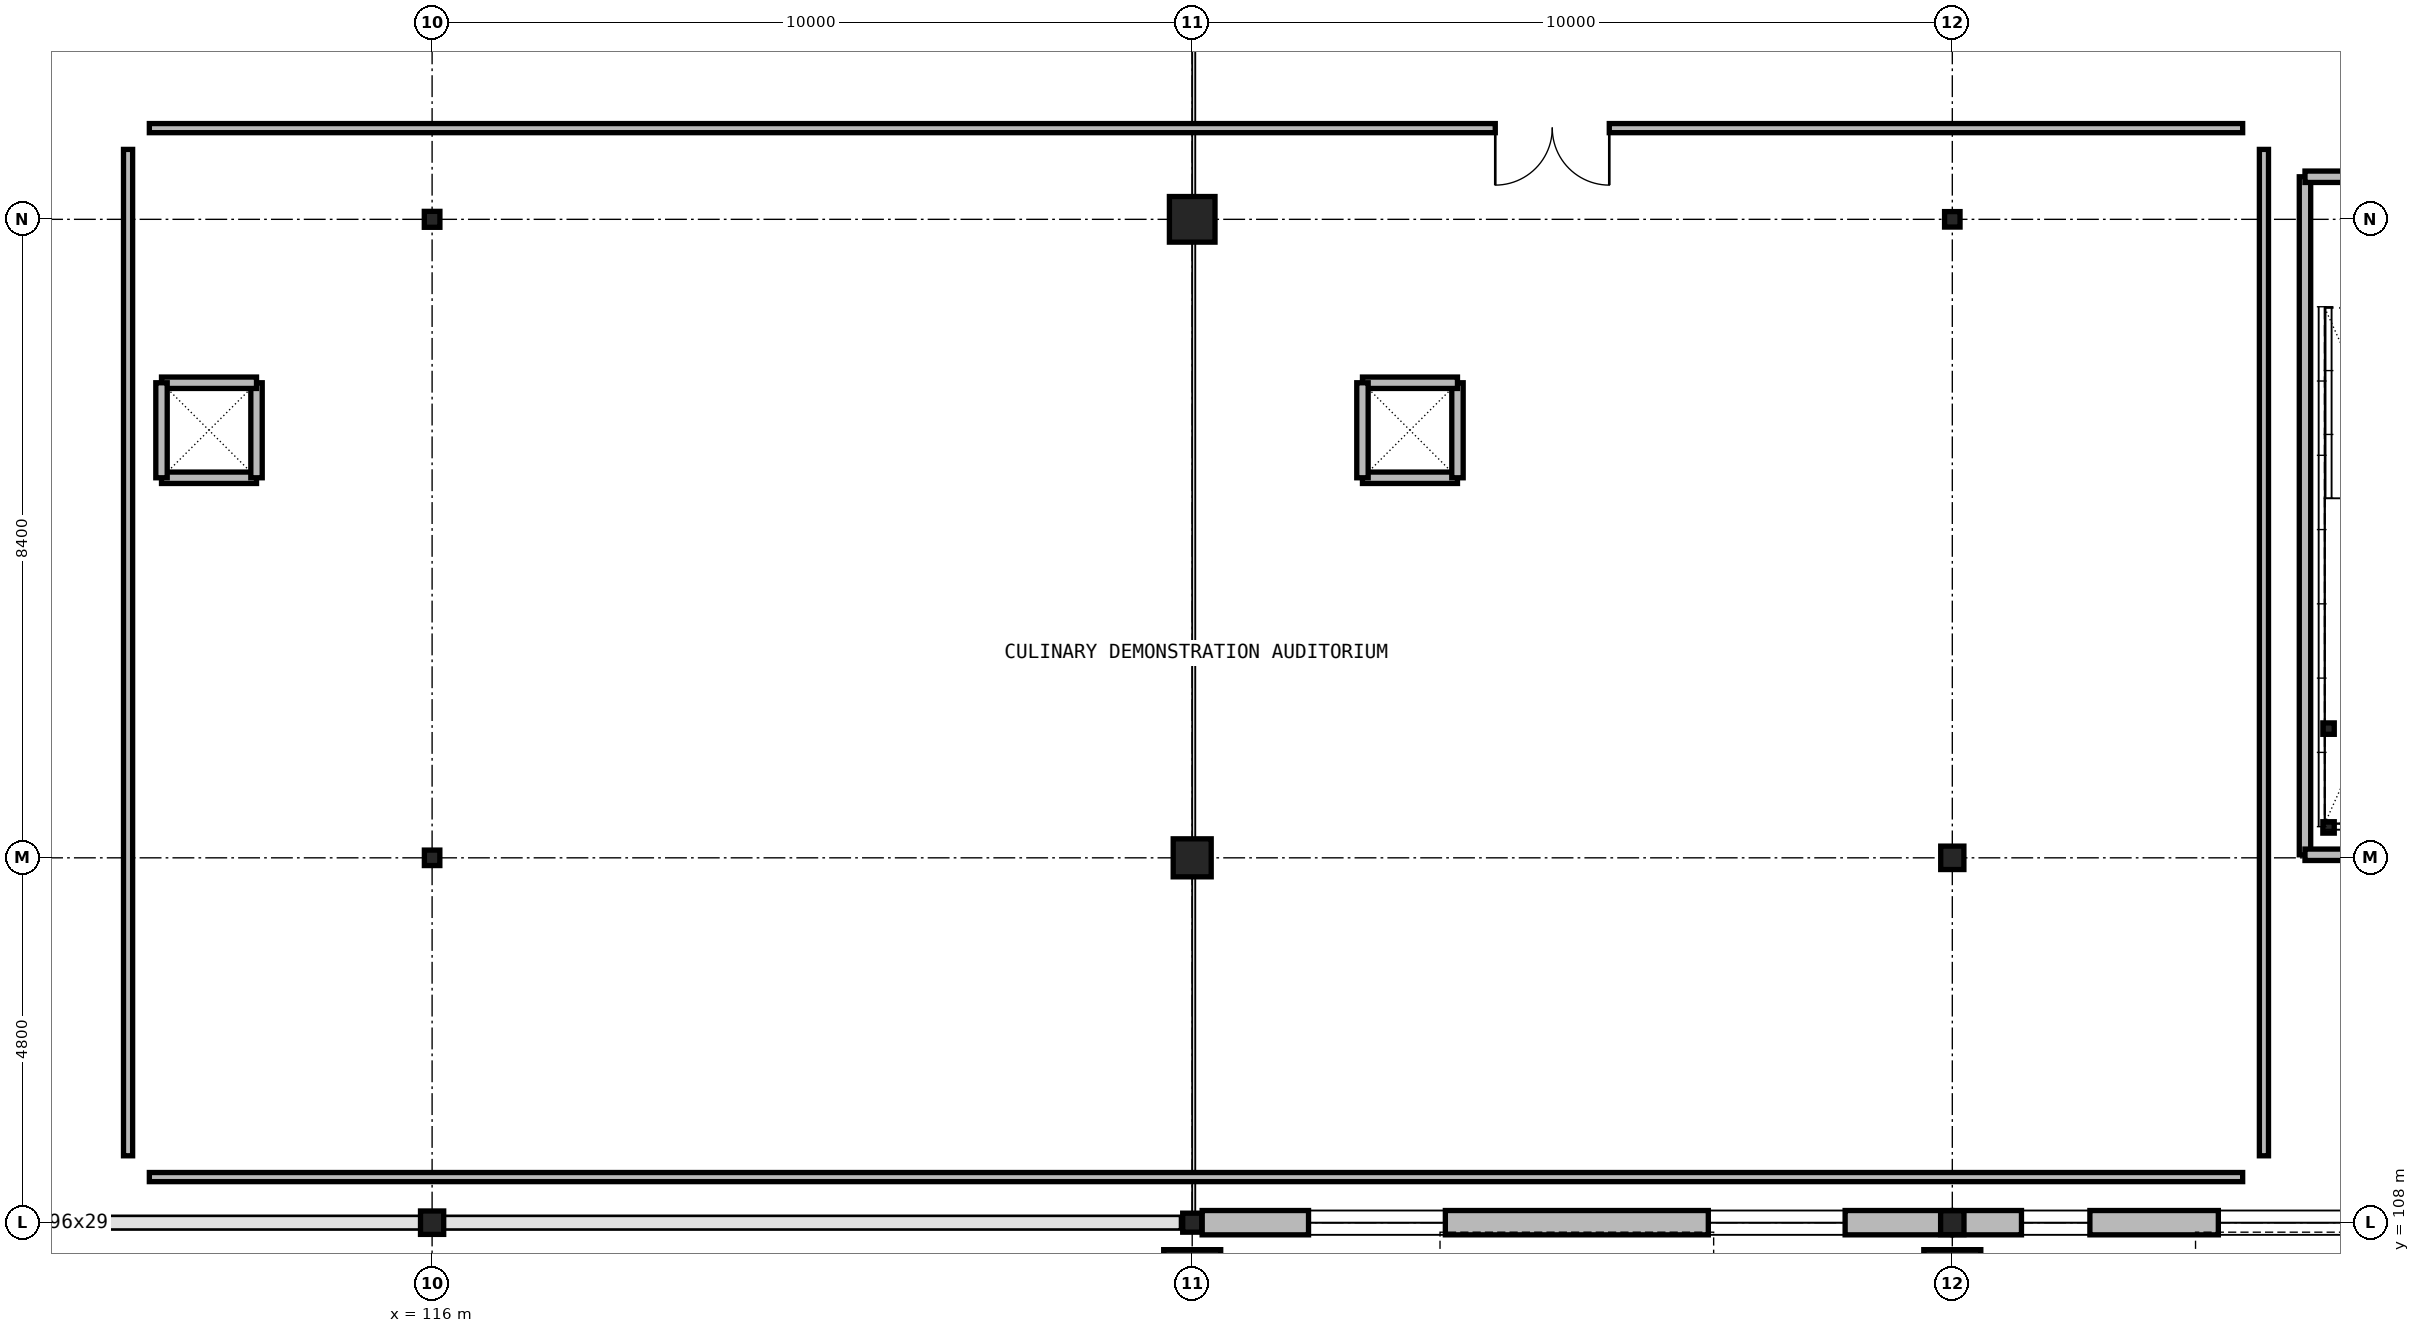
"""IFC4 building model, lengths in metres.
Left out: names, types, materials, properties, quantities, classifications, styles, units other than length and angle.
Written with IfcOpenShell. Run it as: python <this file> out.ifc"""

import sys

from ifc_helpers import new_model, si_unit, direction, frame, frame_2d, origin, origin_2d_with_axis, place, context, subcontext, project, spatial, rectangle, hollow_rectangle, i_section, extrude, element, fill, save


model = new_model("IFC4")
c1 = context("Model", 3, precision=1e-05, world=origin(), true_north=direction((0.0, 1.0)))
c2 = subcontext(c1, "Body", "Model", "MODEL_VIEW")
j1 = project(units=[si_unit("LENGTHUNIT", "METRE"), si_unit("PLANEANGLEUNIT", "RADIAN")], contexts=[c1])
p1 = place(None, origin())
s1 = spatial("IfcSite", under=j1, at=p1, CompositionType="ELEMENT")
p2 = place(p1, origin())
s2 = spatial("IfcBuilding", under=s1, at=p2, CompositionType="ELEMENT")
p3 = place(p2, frame((0.0, 0.0, 8.4)))
s3 = spatial("IfcBuildingStorey", under=s2, at=p3, CompositionType="ELEMENT", Elevation=8.4)
for number, where, z_axis, x_axis in (
    (1, (126.0, 107.42, 0.0), (0.0, 0.0, 1.0), (1.0, 0.0, 0.0)),
    (2, (136.0, 107.42, 0.0), (0.0, 0.0, 1.0), (1.0, 0.0, 0.0)),
):
    element("IfcColumn", number, at=place(p3, frame(where, z_axis=z_axis, x_axis=x_axis)), inside=s3, PredefinedType="PILASTER", context=c2, shape_type="SweptSolid", body=[
        extrude(rectangle(XDim=0.75, YDim=0.45, at=origin_2d_with_axis()), origin(), (0.0, 0.0, 1.0), 3.6),
    ])
p4 = place(p3, frame((116.0, 108.0, 0.0), z_axis=(0.0, 0.0, 1.0), x_axis=(1.0, 0.0, 0.0)))
e3 = element("IfcColumn", 3, at=p4, inside=s3, PredefinedType="COLUMN", context=c2, shape_type="SweptSolid", body=[
    extrude(i_section(OverallWidth=0.305, OverallDepth=0.308, WebThickness=0.01, FlangeThickness=0.015, FilletRadius=0.017, at=origin_2d_with_axis()), origin(), (0.0, 0.0, 1.0), 3.6),
])
p5 = place(p3, frame((116.0, 112.8, 0.0), z_axis=(0.0, 0.0, 1.0), x_axis=(1.0, 0.0, 0.0)))
e4 = element("IfcColumn", 4, at=p5, inside=s3, PredefinedType="COLUMN", context=c2, shape_type="SweptSolid", body=[
    extrude(i_section(OverallWidth=0.203, OverallDepth=0.203, WebThickness=0.007, FlangeThickness=0.011, FilletRadius=0.011, at=origin_2d_with_axis()), origin(), (0.0, 0.0, 1.0), 3.6),
])
p6 = place(p3, frame((116.0, 121.2, 0.0), z_axis=(0.0, 0.0, 1.0), x_axis=(1.0, 0.0, 0.0)))
e5 = element("IfcColumn", 5, at=p6, inside=s3, PredefinedType="COLUMN", context=c2, shape_type="SweptSolid", body=[
    extrude(i_section(OverallWidth=0.205, OverallDepth=0.21, WebThickness=0.009, FlangeThickness=0.014, FilletRadius=0.011, at=origin_2d_with_axis()), origin(), (0.0, 0.0, 1.0), 3.6),
])
p7 = place(p3, frame((126.0, 108.0, 0.0), z_axis=(0.0, 0.0, 1.0), x_axis=(1.0, 0.0, 0.0)))
e6 = element("IfcColumn", 6, at=p7, inside=s3, PredefinedType="COLUMN", context=c2, shape_type="SweptSolid", body=[
    extrude(hollow_rectangle(XDim=0.25, YDim=0.25, WallThickness=0.009, InnerFilletRadius=0.009, OuterFilletRadius=0.018, at=origin_2d_with_axis()), origin(), (0.0, 0.0, 1.0), 3.6),
])
p8 = place(p3, frame((126.0, 112.8, 0.0), z_axis=(0.0, 0.0, 1.0), x_axis=(1.0, 0.0, 0.0)))
e7 = element("IfcColumn", 7, at=p8, inside=s3, PredefinedType="COLUMN", context=c2, shape_type="SweptSolid", body=[
    extrude(rectangle(XDim=0.5, YDim=0.5, at=origin_2d_with_axis()), origin(), (0.0, 0.0, 1.0), 3.6),
])
p9 = place(p3, frame((126.0, 121.2, 0.0), z_axis=(0.0, 0.0, 1.0), x_axis=(1.0, 0.0, 0.0)))
e8 = element("IfcColumn", 8, at=p9, inside=s3, PredefinedType="COLUMN", context=c2, shape_type="SweptSolid", body=[
    extrude(rectangle(XDim=0.6, YDim=0.6, at=origin_2d_with_axis()), origin(), (0.0, 0.0, 1.0), 3.6),
])
p10 = place(p3, frame((136.0, 108.0, 0.0), z_axis=(0.0, 0.0, 1.0), x_axis=(1.0, 0.0, 0.0)))
e9 = element("IfcColumn", 9, at=p10, inside=s3, PredefinedType="COLUMN", context=c2, shape_type="SweptSolid", body=[
    extrude(i_section(OverallWidth=0.307, OverallDepth=0.315, WebThickness=0.012, FlangeThickness=0.019, FilletRadius=0.017, at=origin_2d_with_axis()), origin(), (0.0, 0.0, 1.0), 3.6),
])
p11 = place(p3, frame((136.0, 112.8, 0.0), z_axis=(0.0, 0.0, 1.0), x_axis=(1.0, 0.0, 0.0)))
e10 = element("IfcColumn", 10, at=p11, inside=s3, PredefinedType="COLUMN", context=c2, shape_type="SweptSolid", body=[
    extrude(i_section(OverallWidth=0.305, OverallDepth=0.308, WebThickness=0.01, FlangeThickness=0.015, FilletRadius=0.017, at=origin_2d_with_axis()), origin(), (0.0, 0.0, 1.0), 3.6),
])
p12 = place(p3, frame((136.0, 121.2, 0.0), z_axis=(0.0, 0.0, 1.0), x_axis=(1.0, 0.0, 0.0)))
e11 = element("IfcColumn", 11, at=p12, inside=s3, PredefinedType="COLUMN", context=c2, shape_type="SweptSolid", body=[
    extrude(i_section(OverallWidth=0.203, OverallDepth=0.203, WebThickness=0.007, FlangeThickness=0.011, FilletRadius=0.011, at=origin_2d_with_axis()), origin(), (0.0, 0.0, 1.0), 3.6),
])
for number, where, z_axis, x_axis in (
    (12, (140.95, 113.2, 0.0), (0.0, 0.0, 1.0), (1.0, 0.0, 0.0)),
    (13, (140.95, 114.5, 0.0), (0.0, 0.0, 1.0), (1.0, 0.0, 0.0)),
):
    element("IfcColumn", number, at=place(p3, frame(where, z_axis=z_axis, x_axis=x_axis)), inside=s3, PredefinedType="COLUMN", context=c2, shape_type="SweptSolid", body=[
        extrude(hollow_rectangle(XDim=0.15, YDim=0.15, WallThickness=0.006, InnerFilletRadius=0.006, OuterFilletRadius=0.012, at=origin_2d_with_axis()), origin(), (0.0, 0.0, 1.0), 3.6),
    ])
p13 = place(p3, frame((126.131, 108.0, 0.0), z_axis=(0.0, 0.0, 1.0), x_axis=(1.0, 0.0, 0.0)))
e14 = element("IfcWall", 14, at=p13, inside=s3, PredefinedType="SOLIDWALL", context=c2, shape_type="SweptSolid", body=[
    extrude(rectangle(XDim=9.859, YDim=0.32, at=frame_2d((4.93, 0.0), x_axis=(1.0, 0.0))), origin(), (0.0, 0.0, 1.0), 2.92),
])
p14 = place(p13, frame((1.4, 0.0, 0.85)))
e15 = element("IfcOpeningElement", 15, at=p14, cuts=e14, PredefinedType="OPENING", context=c2, shape_type="SweptSolid", body=[
    extrude(rectangle(XDim=1.8, YDim=1.9, at=frame_2d((0.9, 0.95), x_axis=(1.0, 0.0))), frame((0.0, 0.17, 0.0), z_axis=(0.0, -1.0, 0.0), x_axis=(1.0, 0.0, 0.0)), (0.0, 0.0, 1.0), 0.34),
])
p15 = place(p13, frame((6.659, 0.0, 0.85)))
e16 = element("IfcOpeningElement", 16, at=p15, cuts=e14, PredefinedType="OPENING", context=c2, shape_type="SweptSolid", body=[
    extrude(rectangle(XDim=1.8, YDim=1.9, at=frame_2d((0.9, 0.95), x_axis=(1.0, 0.0))), frame((0.0, 0.17, 0.0), z_axis=(0.0, -1.0, 0.0), x_axis=(1.0, 0.0, 0.0)), (0.0, 0.0, 1.0), 0.34),
])
p16 = place(p3, frame((136.01, 108.0, 0.0), z_axis=(0.0, 0.0, 1.0), x_axis=(1.0, 0.0, 0.0)))
e17 = element("IfcWall", 17, at=p16, inside=s3, PredefinedType="SOLIDWALL", context=c2, shape_type="SweptSolid", body=[
    extrude(rectangle(XDim=9.98, YDim=0.32, at=frame_2d((4.99, 0.0), x_axis=(1.0, 0.0))), origin(), (0.0, 0.0, 1.0), 2.92),
])
p17 = place(p16, frame((3.49, 0.0, 0.85)))
e18 = element("IfcOpeningElement", 18, at=p17, cuts=e17, PredefinedType="OPENING", context=c2, shape_type="SweptSolid", body=[
    extrude(rectangle(XDim=3.0, YDim=1.9, at=frame_2d((1.5, 0.95), x_axis=(1.0, 0.0))), frame((0.0, 0.17, 0.0), z_axis=(0.0, -1.0, 0.0), x_axis=(1.0, 0.0, 0.0)), (0.0, 0.0, 1.0), 0.34),
])
p18 = place(p16, frame((0.9, 0.0, 0.85)))
e19 = element("IfcOpeningElement", 19, at=p18, cuts=e17, PredefinedType="OPENING", context=c2, shape_type="SweptSolid", body=[
    extrude(rectangle(XDim=0.9, YDim=1.9, at=frame_2d((0.45, 0.95), x_axis=(1.0, 0.0))), frame((0.0, 0.17, 0.0), z_axis=(0.0, -1.0, 0.0), x_axis=(1.0, 0.0, 0.0)), (0.0, 0.0, 1.0), 0.34),
])
p19 = place(p16, frame((8.18, 0.0, 0.85)))
e20 = element("IfcOpeningElement", 20, at=p19, cuts=e17, PredefinedType="OPENING", context=c2, shape_type="SweptSolid", body=[
    extrude(rectangle(XDim=0.9, YDim=1.9, at=frame_2d((0.45, 0.95), x_axis=(1.0, 0.0))), frame((0.0, 0.17, 0.0), z_axis=(0.0, -1.0, 0.0), x_axis=(1.0, 0.0, 0.0)), (0.0, 0.0, 1.0), 0.34),
])
p20 = place(p3, frame((140.64, 121.76, 0.0), z_axis=(0.0, 0.0, 1.0), x_axis=(0.0, -1.0, 0.0)))
e21 = element("IfcWall", 21, at=p20, inside=s3, PredefinedType="PARTITIONING", context=c2, shape_type="SweptSolid", body=[
    extrude(rectangle(XDim=8.92, YDim=0.15, at=frame_2d((4.46, 0.0), x_axis=(1.0, 0.0))), origin(), (0.0, 0.0, 1.0), 2.78),
])
p21 = place(p3, frame((140.64, 112.84, 0.0), z_axis=(0.0, 0.0, 1.0), x_axis=(1.0, 0.0, 0.0)))
e22 = element("IfcWall", 22, at=p21, inside=s3, PredefinedType="PARTITIONING", context=c2, shape_type="SweptSolid", body=[
    extrude(rectangle(XDim=3.62, YDim=0.15, at=frame_2d((1.81, 0.0), x_axis=(1.0, 0.0))), origin(), (0.0, 0.0, 1.0), 2.78),
])
p22 = place(p3, frame((144.26, 121.76, 0.0), z_axis=(0.0, 0.0, 1.0), x_axis=(-1.0, 0.0, 0.0)))
e23 = element("IfcWall", 23, at=p22, inside=s3, PredefinedType="PARTITIONING", context=c2, shape_type="SweptSolid", body=[
    extrude(rectangle(XDim=3.62, YDim=0.15, at=frame_2d((1.81, 0.0), x_axis=(1.0, 0.0))), origin(), (0.0, 0.0, 1.0), 2.78),
])
p23 = place(p22, frame((1.31, 0.0, 0.0)))
e24 = element("IfcOpeningElement", 24, at=p23, cuts=e23, PredefinedType="OPENING", context=c2, shape_type="SweptSolid", body=[
    extrude(rectangle(XDim=1.0, YDim=2.15, at=frame_2d((0.5, 1.075), x_axis=(1.0, 0.0))), frame((0.0, 0.085, 0.0), z_axis=(0.0, -1.0, 0.0), x_axis=(1.0, 0.0, 0.0)), (0.0, 0.0, 1.0), 0.17),
])
for number, where, z_axis, x_axis in (
    (25, (112.44, 117.8, 0.0), (0.0, 0.0, 1.0), (1.0, 0.0, 0.0)),
    (26, (113.69, 117.8, 0.0), (0.0, 0.0, 1.0), (0.0, 1.0, 0.0)),
    (27, (113.69, 119.05, 0.0), (0.0, 0.0, 1.0), (-1.0, 0.0, 0.0)),
    (28, (112.44, 119.05, 0.0), (0.0, 0.0, 1.0), (0.0, -1.0, 0.0)),
    (29, (128.24, 117.8, 0.0), (0.0, 0.0, 1.0), (1.0, 0.0, 0.0)),
    (30, (129.49, 117.8, 0.0), (0.0, 0.0, 1.0), (0.0, 1.0, 0.0)),
    (31, (129.49, 119.05, 0.0), (0.0, 0.0, 1.0), (-1.0, 0.0, 0.0)),
    (32, (128.24, 119.05, 0.0), (0.0, 0.0, 1.0), (0.0, -1.0, 0.0)),
):
    element("IfcWall", number, at=place(p3, frame(where, z_axis=z_axis, x_axis=x_axis)), inside=s3, PredefinedType="PARTITIONING", context=c2, shape_type="SweptSolid", body=[
        extrude(rectangle(XDim=1.25, YDim=0.15, at=frame_2d((0.625, 0.0), x_axis=(1.0, 0.0))), origin(), (0.0, 0.0, 1.0), 2.88),
    ])
p24 = place(p3, frame((112.28, 108.6, 0.0), z_axis=(0.0, 0.0, 1.0), x_axis=(1.0, 0.0, 0.0)))
e33 = element("IfcWall", 33, at=p24, inside=s3, PredefinedType="PARTITIONING", context=c2, shape_type="SweptSolid", body=[
    extrude(rectangle(XDim=27.54, YDim=0.12, at=frame_2d((13.77, 0.0), x_axis=(1.0, 0.0))), origin(), (0.0, 0.0, 1.0), 2.74),
])
p25 = place(p3, frame((140.1, 108.88, 0.0), z_axis=(0.0, 0.0, 1.0), x_axis=(0.0, 1.0, 0.0)))
e34 = element("IfcWall", 34, at=p25, inside=s3, PredefinedType="PARTITIONING", context=c2, shape_type="SweptSolid", body=[
    extrude(rectangle(XDim=13.24, YDim=0.12, at=frame_2d((6.62, 0.0), x_axis=(1.0, 0.0))), origin(), (0.0, 0.0, 1.0), 2.74),
])
p26 = place(p3, frame((139.82, 122.4, 0.0), z_axis=(0.0, 0.0, 1.0), x_axis=(-1.0, 0.0, 0.0)))
e35 = element("IfcWall", 35, at=p26, inside=s3, PredefinedType="PARTITIONING", context=c2, shape_type="SweptSolid", body=[
    extrude(rectangle(XDim=27.54, YDim=0.12, at=frame_2d((13.77, 0.0), x_axis=(1.0, 0.0))), origin(), (0.0, 0.0, 1.0), 2.74),
])
p27 = place(p26, frame((8.333, 0.0, 0.0)))
e36 = element("IfcOpeningElement", 36, at=p27, cuts=e35, PredefinedType="OPENING", context=c2, shape_type="SweptSolid", body=[
    extrude(rectangle(XDim=1.5, YDim=2.25, at=frame_2d((0.75, 1.125), x_axis=(1.0, 0.0))), frame((0.0, 0.07, 0.0), z_axis=(0.0, -1.0, 0.0), x_axis=(1.0, 0.0, 0.0)), (0.0, 0.0, 1.0), 0.14),
])
p28 = place(p3, frame((112.0, 122.12, 0.0), z_axis=(0.0, 0.0, 1.0), x_axis=(0.0, -1.0, 0.0)))
e37 = element("IfcWall", 37, at=p28, inside=s3, PredefinedType="PARTITIONING", context=c2, shape_type="SweptSolid", body=[
    extrude(rectangle(XDim=13.24, YDim=0.12, at=frame_2d((6.62, 0.0), x_axis=(1.0, 0.0))), origin(), (0.0, 0.0, 1.0), 2.74),
])
p29 = place(p14, origin())
e38 = element("IfcWindow", 38, at=p29, inside=s3, PartitioningType="SINGLE_PANEL", PredefinedType="WINDOW", context=c2, shape_type="SweptSolid", body=[
    extrude(rectangle(XDim=1.8, YDim=1.9, at=frame_2d((0.9, 0.95), x_axis=(1.0, 0.0))), frame((0.0, 0.03, 0.0), z_axis=(0.0, -1.0, 0.0), x_axis=(1.0, 0.0, 0.0)), (0.0, 0.0, 1.0), 0.06),
])
fill(e15, e38)
p30 = place(p15, origin())
e39 = element("IfcWindow", 39, at=p30, inside=s3, PartitioningType="SINGLE_PANEL", PredefinedType="WINDOW", context=c2, shape_type="SweptSolid", body=[
    extrude(rectangle(XDim=1.8, YDim=1.9, at=frame_2d((0.9, 0.95), x_axis=(1.0, 0.0))), frame((0.0, 0.03, 0.0), z_axis=(0.0, -1.0, 0.0), x_axis=(1.0, 0.0, 0.0)), (0.0, 0.0, 1.0), 0.06),
])
fill(e16, e39)
p31 = place(p17, origin())
e40 = element("IfcWindow", 40, at=p31, inside=s3, PartitioningType="SINGLE_PANEL", PredefinedType="WINDOW", context=c2, shape_type="SweptSolid", body=[
    extrude(rectangle(XDim=3.0, YDim=1.9, at=frame_2d((1.5, 0.95), x_axis=(1.0, 0.0))), frame((0.0, 0.03, 0.0), z_axis=(0.0, -1.0, 0.0), x_axis=(1.0, 0.0, 0.0)), (0.0, 0.0, 1.0), 0.06),
])
fill(e18, e40)
p32 = place(p18, origin())
e41 = element("IfcWindow", 41, at=p32, inside=s3, PartitioningType="SINGLE_PANEL", PredefinedType="WINDOW", context=c2, shape_type="SweptSolid", body=[
    extrude(rectangle(XDim=0.9, YDim=1.9, at=frame_2d((0.45, 0.95), x_axis=(1.0, 0.0))), frame((0.0, 0.03, 0.0), z_axis=(0.0, -1.0, 0.0), x_axis=(1.0, 0.0, 0.0)), (0.0, 0.0, 1.0), 0.06),
])
fill(e19, e41)
p33 = place(p27, origin())
e42 = element("IfcDoor", 42, at=p33, inside=s3, OperationType="DOUBLE_SWING_RIGHT", PredefinedType="DOOR", context=c2, shape_type="SweptSolid", body=[
    extrude(rectangle(XDim=1.5, YDim=2.25, at=frame_2d((0.75, 1.125), x_axis=(1.0, 0.0))), frame((0.0, 0.025, 0.0), z_axis=(0.0, -1.0, 0.0), x_axis=(1.0, 0.0, 0.0)), (0.0, 0.0, 1.0), 0.05),
])
fill(e36, e42)
save(model, sys.argv[1])
